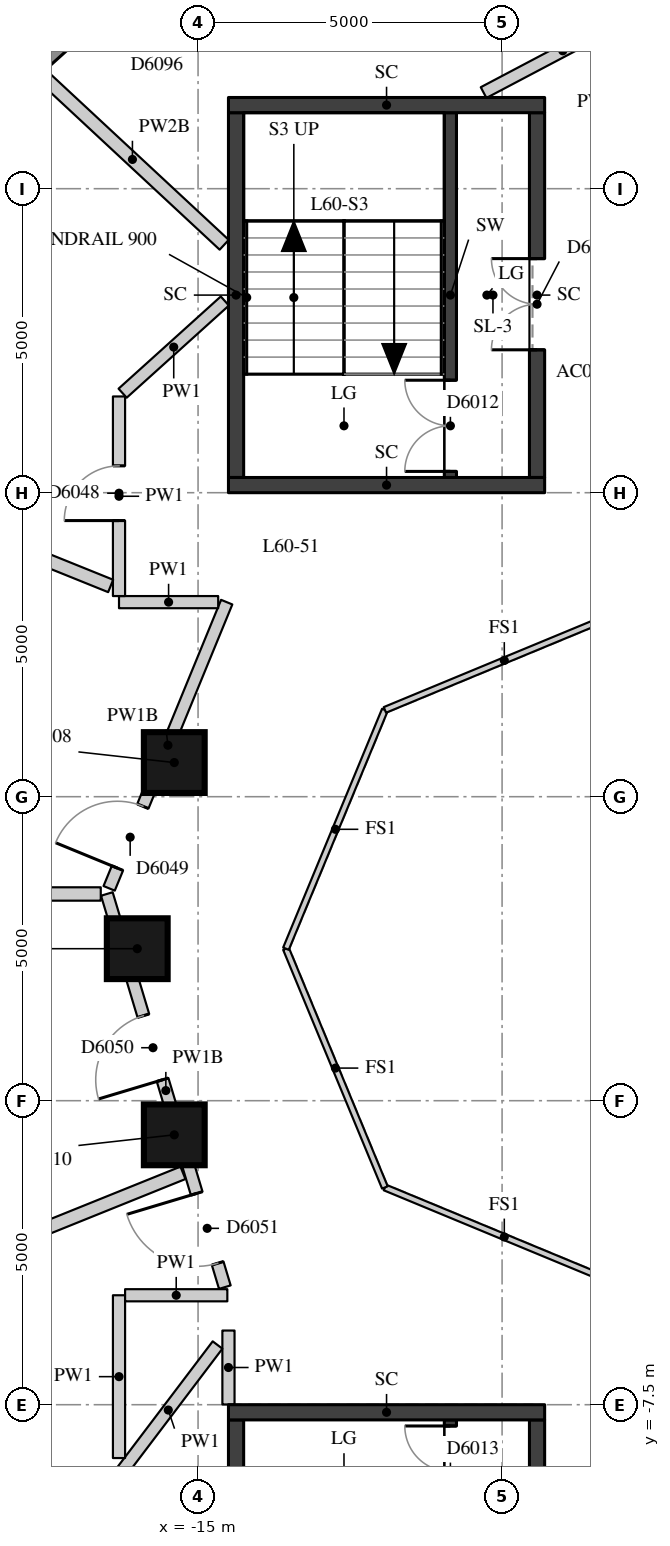
"""IFC4 building model, lengths in metres.
Left out: names, types, materials, properties, quantities, classifications, styles, units other than length and angle.
Written with IfcOpenShell. Run it as: python <this file> out.ifc"""

import sys

from ifc_helpers import new_model, si_unit, direction, frame, frame_2d, origin, origin_2d, place, context, subcontext, project, spatial, rectangle, extrude, element, fill, save


model = new_model("IFC4")
c1 = context("Model", 3, precision=1e-05, world=origin(), true_north=direction((0.0, 1.0)))
c2 = subcontext(c1, "Body", "Model", "MODEL_VIEW")
j1 = project(units=[si_unit("LENGTHUNIT", "METRE"), si_unit("PLANEANGLEUNIT", "RADIAN")], contexts=[c1])
p1 = place(None, origin())
s1 = spatial("IfcSite", under=j1, at=p1, CompositionType="ELEMENT")
p2 = place(p1, origin())
s2 = spatial("IfcBuilding", under=s1, at=p2, CompositionType="ELEMENT")
p3 = place(p2, frame((0.0, 0.0, 212.3)))
s3 = spatial("IfcBuildingStorey", under=s2, at=p3, CompositionType="ELEMENT", Elevation=212.3)
for number, where, z_axis, x_axis in (
    (1, (-15.391, 3.062, 0.0), (0.0, 0.0, 1.0), (1.0, 0.0, 0.0)),
    (2, (-16.0, 0.0, 0.0), (0.0, 0.0, 1.0), (1.0, 0.0, 0.0)),
    (3, (-15.391, -3.062, 0.0), (0.0, 0.0, 1.0), (1.0, 0.0, 0.0)),
):
    element("IfcColumn", number, at=place(p3, frame(where, z_axis=z_axis, x_axis=x_axis)), inside=s3, PredefinedType="COLUMN", context=c2, shape_type="SweptSolid", body=[
        extrude(rectangle(XDim=1.0, YDim=1.0, at=origin_2d()), origin(), (0.0, 0.0, 1.0), 3.3),
    ])
p4 = place(p3, frame((-14.799, 17.205, 0.0), z_axis=(0.0, 0.0, 1.0), x_axis=(-0.742488361714, -0.669858964798, 0.0)))
e4 = element("IfcWall", 4, at=p4, inside=s3, PredefinedType="SOLIDWALL", context=c2, shape_type="SweptSolid", body=[
    extrude(rectangle(XDim=3.98, YDim=0.45, at=frame_2d((1.99, 0.0))), origin(), (0.0, 0.0, 1.0), 3.02),
])
p5 = place(p4, frame((0.915, 0.0, 0.4)))
e5 = element("IfcOpeningElement", 5, at=p5, cuts=e4, PredefinedType="OPENING", context=c2, shape_type="SweptSolid", body=[
    extrude(rectangle(XDim=1.0, YDim=1.75, at=frame_2d((0.5, 0.875))), frame((0.0, 0.235, 0.0), z_axis=(0.0, -1.0, 0.0), x_axis=(1.0, 0.0, 0.0)), (0.0, 0.0, 1.0), 0.47),
])
p6 = place(p4, frame((2.065, 0.0, 0.0)))
e6 = element("IfcOpeningElement", 6, at=p6, cuts=e4, PredefinedType="OPENING", context=c2, shape_type="SweptSolid", body=[
    extrude(rectangle(XDim=1.0, YDim=2.15, at=frame_2d((0.5, 1.075))), frame((0.0, 0.235, 0.0), z_axis=(0.0, -1.0, 0.0), x_axis=(1.0, 0.0, 0.0)), (0.0, 0.0, 1.0), 0.47),
])
p7 = place(p3, frame((-10.85, 7.75, 0.0), z_axis=(0.0, 0.0, 1.0), x_axis=(0.0, 1.0, 0.0)))
e7 = element("IfcWall", 7, at=p7, inside=s3, PredefinedType="SHEAR", context=c2, shape_type="SweptSolid", body=[
    extrude(rectangle(XDim=6.0, YDim=0.2, at=frame_2d((3.0, 0.0))), origin(), (0.0, 0.0, 1.0), 3.02),
])
p8 = place(p7, frame((0.1, 0.0, 0.0)))
e8 = element("IfcOpeningElement", 8, at=p8, cuts=e7, PredefinedType="OPENING", context=c2, shape_type="SweptSolid", body=[
    extrude(rectangle(XDim=1.5, YDim=2.1, at=frame_2d((0.75, 1.05))), frame((0.0, 0.11, 0.0), z_axis=(0.0, -1.0, 0.0), x_axis=(1.0, 0.0, 0.0)), (0.0, 0.0, 1.0), 0.22),
])
p9 = place(p3, frame((-10.85, -13.75, 0.0), z_axis=(0.0, 0.0, 1.0), x_axis=(0.0, 1.0, 0.0)))
e9 = element("IfcWall", 9, at=p9, inside=s3, PredefinedType="SHEAR", context=c2, shape_type="SweptSolid", body=[
    extrude(rectangle(XDim=6.0, YDim=0.2, at=frame_2d((3.0, 0.0))), origin(), (0.0, 0.0, 1.0), 3.02),
])
p10 = place(p9, frame((4.4, 0.0, 0.0)))
e10 = element("IfcOpeningElement", 10, at=p10, cuts=e9, PredefinedType="OPENING", context=c2, shape_type="SweptSolid", body=[
    extrude(rectangle(XDim=1.5, YDim=2.1, at=frame_2d((0.75, 1.05))), frame((0.0, 0.11, 0.0), z_axis=(0.0, -1.0, 0.0), x_axis=(1.0, 0.0, 0.0)), (0.0, 0.0, 1.0), 0.22),
])
p11 = place(p3, frame((-14.375, 7.75, -0.28), z_axis=(0.0, 0.0, 1.0), x_axis=(0.0, 1.0, 0.0)))
e11 = element("IfcWall", 11, at=p11, inside=s3, PredefinedType="SHEAR", context=c2, shape_type="SweptSolid", body=[
    extrude(rectangle(XDim=6.0, YDim=0.25, at=frame_2d((3.0, 0.0))), origin(), (0.0, 0.0, 1.0), 3.3),
])
p12 = place(p3, frame((-9.425, 7.75, -0.28), z_axis=(0.0, 0.0, 1.0), x_axis=(0.0, 1.0, 0.0)))
e12 = element("IfcWall", 12, at=p12, inside=s3, PredefinedType="SHEAR", context=c2, shape_type="SweptSolid", body=[
    extrude(rectangle(XDim=6.0, YDim=0.25, at=frame_2d((3.0, 0.0))), origin(), (0.0, 0.0, 1.0), 3.3),
])
p13 = place(p12, frame((2.1, 0.0, 0.28)))
e13 = element("IfcOpeningElement", 13, at=p13, cuts=e12, PredefinedType="OPENING", context=c2, shape_type="SweptSolid", body=[
    extrude(rectangle(XDim=1.5, YDim=2.1, at=frame_2d((0.75, 1.05))), frame((0.0, 0.135, 0.0), z_axis=(0.0, -1.0, 0.0), x_axis=(1.0, 0.0, 0.0)), (0.0, 0.0, 1.0), 0.27),
])
for number, where, z_axis, x_axis in (
    (14, (-14.5, 13.875, -0.28), (0.0, 0.0, 1.0), (1.0, 0.0, 0.0)),
    (15, (-14.5, 7.625, -0.28), (0.0, 0.0, 1.0), (1.0, 0.0, 0.0)),
):
    element("IfcWall", number, at=place(p3, frame(where, z_axis=z_axis, x_axis=x_axis)), inside=s3, PredefinedType="SHEAR", context=c2, shape_type="SweptSolid", body=[
        extrude(rectangle(XDim=5.2, YDim=0.25, at=frame_2d((2.6, 0.0))), origin(), (0.0, 0.0, 1.0), 3.3),
    ])
p14 = place(p3, frame((-14.375, -13.75, -0.28), z_axis=(0.0, 0.0, 1.0), x_axis=(0.0, 1.0, 0.0)))
e16 = element("IfcWall", 16, at=p14, inside=s3, PredefinedType="SHEAR", context=c2, shape_type="SweptSolid", body=[
    extrude(rectangle(XDim=6.0, YDim=0.25, at=frame_2d((3.0, 0.0))), origin(), (0.0, 0.0, 1.0), 3.3),
])
p15 = place(p3, frame((-9.425, -13.75, -0.28), z_axis=(0.0, 0.0, 1.0), x_axis=(0.0, 1.0, 0.0)))
e17 = element("IfcWall", 17, at=p15, inside=s3, PredefinedType="SHEAR", context=c2, shape_type="SweptSolid", body=[
    extrude(rectangle(XDim=6.0, YDim=0.25, at=frame_2d((3.0, 0.0))), origin(), (0.0, 0.0, 1.0), 3.3),
])
p16 = place(p15, frame((2.4, 0.0, 0.28)))
e18 = element("IfcOpeningElement", 18, at=p16, cuts=e17, PredefinedType="OPENING", context=c2, shape_type="SweptSolid", body=[
    extrude(rectangle(XDim=1.5, YDim=2.1, at=frame_2d((0.75, 1.05))), frame((0.0, 0.135, 0.0), z_axis=(0.0, -1.0, 0.0), x_axis=(1.0, 0.0, 0.0)), (0.0, 0.0, 1.0), 0.27),
])
p17 = place(p3, frame((-14.5, -7.625, -0.28), z_axis=(0.0, 0.0, 1.0), x_axis=(1.0, 0.0, 0.0)))
e19 = element("IfcWall", 19, at=p17, inside=s3, PredefinedType="SHEAR", context=c2, shape_type="SweptSolid", body=[
    extrude(rectangle(XDim=5.2, YDim=0.25, at=frame_2d((2.6, 0.0))), origin(), (0.0, 0.0, 1.0), 3.3),
])
p18 = place(p3, frame((-14.5, -7.496, 0.0), z_axis=(0.0, 0.0, 1.0), x_axis=(0.0, 1.0, 0.0)))
e20 = element("IfcWall", 20, at=p18, inside=s3, PredefinedType="PARTITIONING", context=c2, shape_type="SweptSolid", body=[
    extrude(rectangle(XDim=1.216, YDim=0.2, at=frame_2d((0.608, 0.0))), origin(), (0.0, 0.0, 1.0), 3.02),
])
p19 = place(p3, frame((-14.679, -6.518, 0.0), z_axis=(0.0, 0.0, 1.0), x_axis=(-0.603820908912, -0.797120009761, 0.0)))
e21 = element("IfcWall", 21, at=p19, inside=s3, PredefinedType="PARTITIONING", context=c2, shape_type="SweptSolid", body=[
    extrude(rectangle(XDim=2.684, YDim=0.2, at=frame_2d((1.342, 0.0))), origin(), (0.0, 0.0, 1.0), 3.02),
])
p20 = place(p3, frame((-16.3, -8.377, 0.0), z_axis=(0.0, 0.0, 1.0), x_axis=(0.0, 1.0, 0.0)))
e22 = element("IfcWall", 22, at=p20, inside=s3, PredefinedType="PARTITIONING", context=c2, shape_type="SweptSolid", body=[
    extrude(rectangle(XDim=2.677, YDim=0.2, at=frame_2d((1.339, 0.0))), origin(), (0.0, 0.0, 1.0), 3.02),
])
p21 = place(p3, frame((-16.2, -5.7, 0.0), z_axis=(0.0, 0.0, 1.0), x_axis=(1.0, 0.0, 0.0)))
e23 = element("IfcWall", 23, at=p21, inside=s3, PredefinedType="PARTITIONING", context=c2, shape_type="SweptSolid", body=[
    extrude(rectangle(XDim=1.681, YDim=0.2, at=frame_2d((0.841, 0.0))), origin(), (0.0, 0.0, 1.0), 3.02),
])
p22 = place(p3, frame((-14.56, -5.567, 0.0), z_axis=(0.0, 0.0, 1.0), x_axis=(-0.287410918602, 0.95780737305, 0.0)))
e24 = element("IfcWall", 24, at=p22, inside=s3, PredefinedType="PARTITIONING", context=c2, shape_type="SweptSolid", body=[
    extrude(rectangle(XDim=6.751, YDim=0.2, at=frame_2d((3.376, 0.0))), origin(), (0.0, 0.0, 1.0), 2.52),
])
p23 = place(p22, frame((3.561, 0.0, 0.0)))
e25 = element("IfcOpeningElement", 25, at=p23, cuts=e24, PredefinedType="OPENING", context=c2, shape_type="SweptSolid", body=[
    extrude(rectangle(XDim=1.1, YDim=2.1, at=frame_2d((0.55, 1.05))), frame((0.0, 0.11, 0.0), z_axis=(0.0, -1.0, 0.0), x_axis=(1.0, 0.0, 0.0)), (0.0, 0.0, 1.0), 0.22),
])
p24 = place(p22, frame((0.41, 0.0, 0.0)))
e26 = element("IfcOpeningElement", 26, at=p24, cuts=e24, PredefinedType="OPENING", context=c2, shape_type="SweptSolid", body=[
    extrude(rectangle(XDim=1.2, YDim=2.1, at=frame_2d((0.6, 1.05))), frame((0.0, 0.11, 0.0), z_axis=(0.0, -1.0, 0.0), x_axis=(1.0, 0.0, 0.0)), (0.0, 0.0, 1.0), 0.22),
])
p25 = place(p3, frame((-16.462, 0.993, 0.0), z_axis=(0.0, 0.0, 1.0), x_axis=(0.37991958703, 0.925019517303, 0.0)))
e27 = element("IfcWall", 27, at=p25, inside=s3, PredefinedType="PARTITIONING", context=c2, shape_type="SweptSolid", body=[
    extrude(rectangle(XDim=5.089, YDim=0.2, at=frame_2d((2.544, 0.0))), origin(), (0.0, 0.0, 1.0), 2.52),
])
p26 = place(p25, frame((0.36, 0.0, 0.0)))
e28 = element("IfcOpeningElement", 28, at=p26, cuts=e27, PredefinedType="OPENING", context=c2, shape_type="SweptSolid", body=[
    extrude(rectangle(XDim=1.1, YDim=2.1, at=frame_2d((0.55, 1.05))), frame((0.0, 0.11, 0.0), z_axis=(0.0, -1.0, 0.0), x_axis=(1.0, 0.0, 0.0)), (0.0, 0.0, 1.0), 0.22),
])
p27 = place(p3, frame((-14.669, 5.7, 0.0), z_axis=(0.0, 0.0, 1.0), x_axis=(-1.0, 0.0, 0.0)))
e29 = element("IfcWall", 29, at=p27, inside=s3, PredefinedType="PARTITIONING", context=c2, shape_type="SweptSolid", body=[
    extrude(rectangle(XDim=1.631, YDim=0.2, at=frame_2d((0.815, 0.0))), origin(), (0.0, 0.0, 1.0), 3.02),
])
p28 = place(p3, frame((-16.3, 5.8, 0.0), z_axis=(0.0, 0.0, 1.0), x_axis=(0.0, 1.0, 0.0)))
e30 = element("IfcWall", 30, at=p28, inside=s3, PredefinedType="PARTITIONING", context=c2, shape_type="SweptSolid", body=[
    extrude(rectangle(XDim=3.283, YDim=0.2, at=frame_2d((1.641, 0.0))), origin(), (0.0, 0.0, 1.0), 3.02),
])
p29 = place(p28, frame((1.241, 0.0, 0.0)))
e31 = element("IfcOpeningElement", 31, at=p29, cuts=e30, PredefinedType="OPENING", context=c2, shape_type="SweptSolid", body=[
    extrude(rectangle(XDim=0.9, YDim=2.1, at=frame_2d((0.45, 1.05))), frame((0.0, 0.11, 0.0), z_axis=(0.0, -1.0, 0.0), x_axis=(1.0, 0.0, 0.0)), (0.0, 0.0, 1.0), 0.22),
])
p30 = place(p3, frame((-16.24, 9.136, 0.0), z_axis=(0.0, 0.0, 1.0), x_axis=(0.74251608424, 0.66982823518, 0.0)))
e32 = element("IfcWall", 32, at=p30, inside=s3, PredefinedType="PARTITIONING", context=c2, shape_type="SweptSolid", body=[
    extrude(rectangle(XDim=2.264, YDim=0.2, at=frame_2d((1.132, 0.0))), origin(), (0.0, 0.0, 1.0), 3.02),
])
p31 = place(p3, frame((-10.304, 14.081, 0.0), z_axis=(0.0, 0.0, 1.0), x_axis=(0.884325802624, 0.466870297635, 0.0)))
e33 = element("IfcWall", 33, at=p31, inside=s3, PredefinedType="PARTITIONING", context=c2, shape_type="SweptSolid", body=[
    extrude(rectangle(XDim=2.945, YDim=0.2, at=frame_2d((1.472, 0.0))), origin(), (0.0, 0.0, 1.0), 3.02),
])
p32 = place(p3, frame((-17.589, 14.385, 0.0), z_axis=(0.0, 0.0, 1.0), x_axis=(0.732287016614, -0.680996127227, 0.0)))
e34 = element("IfcWall", 34, at=p32, inside=s3, PredefinedType="PARTITIONING", context=c2, shape_type="SweptSolid", body=[
    extrude(rectangle(XDim=4.122, YDim=0.22, at=frame_2d((2.061, 0.0))), origin(), (0.0, 0.0, 1.0), 2.57),
])
p33 = place(p3, frame((-22.896, 8.571, 0.0), z_axis=(0.0, 0.0, 1.0), x_axis=(0.927387137769, -0.374103056256, 0.0)))
e35 = element("IfcWall", 35, at=p33, inside=s3, PredefinedType="PARTITIONING", context=c2, shape_type="SweptSolid", body=[
    extrude(rectangle(XDim=6.964, YDim=0.22, at=frame_2d((3.482, 0.0))), origin(), (0.0, 0.0, 1.0), 3.02),
])
p34 = place(p3, frame((-24.4, 0.9, 0.0), z_axis=(0.0, 0.0, 1.0), x_axis=(1.0, 0.0, 0.0)))
e36 = element("IfcWall", 36, at=p34, inside=s3, PredefinedType="PARTITIONING", context=c2, shape_type="SweptSolid", body=[
    extrude(rectangle(XDim=7.8, YDim=0.22, at=frame_2d((3.9, 0.0))), origin(), (0.0, 0.0, 1.0), 2.47),
])
p35 = place(p3, frame((-22.896, -6.771, 0.0), z_axis=(0.0, 0.0, 1.0), x_axis=(0.92738233242, 0.374114968313, 0.0)))
e37 = element("IfcWall", 37, at=p35, inside=s3, PredefinedType="PARTITIONING", context=c2, shape_type="SweptSolid", body=[
    extrude(rectangle(XDim=8.246, YDim=0.22, at=frame_2d((4.123, 0.0))), origin(), (0.0, 0.0, 1.0), 3.02),
])
for number, where, z_axis, x_axis in (
    (38, (-8.0, -5.554, 0.0), (0.0, 0.0, 1.0), (-0.924, 0.383, 0.0)),
    (39, (-11.927, -3.927, 0.0), (0.0, 0.0, 1.0), (-0.383, 0.924, 0.0)),
    (40, (-13.554, 0.0, 0.0), (0.0, 0.0, 1.0), (0.383, 0.924, 0.0)),
    (41, (-11.927, 3.927, 0.0), (0.0, 0.0, 1.0), (0.924, 0.383, 0.0)),
):
    element("IfcWall", number, at=place(p3, frame(where, z_axis=z_axis, x_axis=x_axis)), inside=s3, PredefinedType="PARTITIONING", context=c2, shape_type="SweptSolid", body=[
        extrude(rectangle(XDim=4.251, YDim=0.1, at=frame_2d((2.125, 0.0))), origin(), (0.0, 0.0, 1.0), 3.02),
    ])
p36 = place(p8, origin())
e42 = element("IfcDoor", 42, at=p36, inside=s3, OperationType="DOUBLE_DOOR_SINGLE_SWING", PredefinedType="DOOR", context=c2, shape_type="SweptSolid", body=[
    extrude(rectangle(XDim=1.5, YDim=2.1, at=frame_2d((0.75, 1.05))), frame((0.0, 0.025, 0.0), z_axis=(0.0, -1.0, 0.0), x_axis=(1.0, 0.0, 0.0)), (0.0, 0.0, 1.0), 0.05),
])
fill(e8, e42)
p37 = place(p10, origin())
e43 = element("IfcDoor", 43, at=p37, inside=s3, OperationType="DOUBLE_DOOR_SINGLE_SWING", PredefinedType="DOOR", context=c2, shape_type="SweptSolid", body=[
    extrude(rectangle(XDim=1.5, YDim=2.1, at=frame_2d((0.75, 1.05))), frame((0.0, 0.025, 0.0), z_axis=(0.0, -1.0, 0.0), x_axis=(1.0, 0.0, 0.0)), (0.0, 0.0, 1.0), 0.05),
])
fill(e10, e43)
p38 = place(p13, origin())
e44 = element("IfcDoor", 44, at=p38, inside=s3, OperationType="DOUBLE_DOOR_SINGLE_SWING", PredefinedType="DOOR", context=c2, shape_type="SweptSolid", body=[
    extrude(rectangle(XDim=1.5, YDim=2.1, at=frame_2d((0.75, 1.05))), frame((0.0, 0.025, 0.0), z_axis=(0.0, -1.0, 0.0), x_axis=(1.0, 0.0, 0.0)), (0.0, 0.0, 1.0), 0.05),
])
fill(e13, e44)
p39 = place(p29, origin())
e45 = element("IfcDoor", 45, at=p39, inside=s3, OperationType="SINGLE_SWING_LEFT", PredefinedType="DOOR", context=c2, shape_type="SweptSolid", body=[
    extrude(rectangle(XDim=0.9, YDim=2.1, at=frame_2d((0.45, 1.05))), frame((0.0, 0.025, 0.0), z_axis=(0.0, -1.0, 0.0), x_axis=(1.0, 0.0, 0.0)), (0.0, 0.0, 1.0), 0.05),
])
fill(e31, e45)
p40 = place(p26, origin())
e46 = element("IfcDoor", 46, at=p40, inside=s3, OperationType="SINGLE_SWING_LEFT", PredefinedType="DOOR", context=c2, shape_type="SweptSolid", body=[
    extrude(rectangle(XDim=1.1, YDim=2.1, at=frame_2d((0.55, 1.05))), frame((0.0, 0.025, 0.0), z_axis=(0.0, -1.0, 0.0), x_axis=(1.0, 0.0, 0.0)), (0.0, 0.0, 1.0), 0.05),
])
fill(e28, e46)
p41 = place(p23, origin())
e47 = element("IfcDoor", 47, at=p41, inside=s3, OperationType="SINGLE_SWING_LEFT", PredefinedType="DOOR", context=c2, shape_type="SweptSolid", body=[
    extrude(rectangle(XDim=1.1, YDim=2.1, at=frame_2d((0.55, 1.05))), frame((0.0, 0.025, 0.0), z_axis=(0.0, -1.0, 0.0), x_axis=(1.0, 0.0, 0.0)), (0.0, 0.0, 1.0), 0.05),
])
fill(e25, e47)
p42 = place(p24, origin())
e48 = element("IfcDoor", 48, at=p42, inside=s3, OperationType="SINGLE_SWING_RIGHT", PredefinedType="DOOR", context=c2, shape_type="SweptSolid", body=[
    extrude(rectangle(XDim=1.2, YDim=2.1, at=frame_2d((0.6, 1.05))), frame((0.0, 0.025, 0.0), z_axis=(0.0, -1.0, 0.0), x_axis=(1.0, 0.0, 0.0)), (0.0, 0.0, 1.0), 0.05),
])
fill(e26, e48)
save(model, sys.argv[1])
